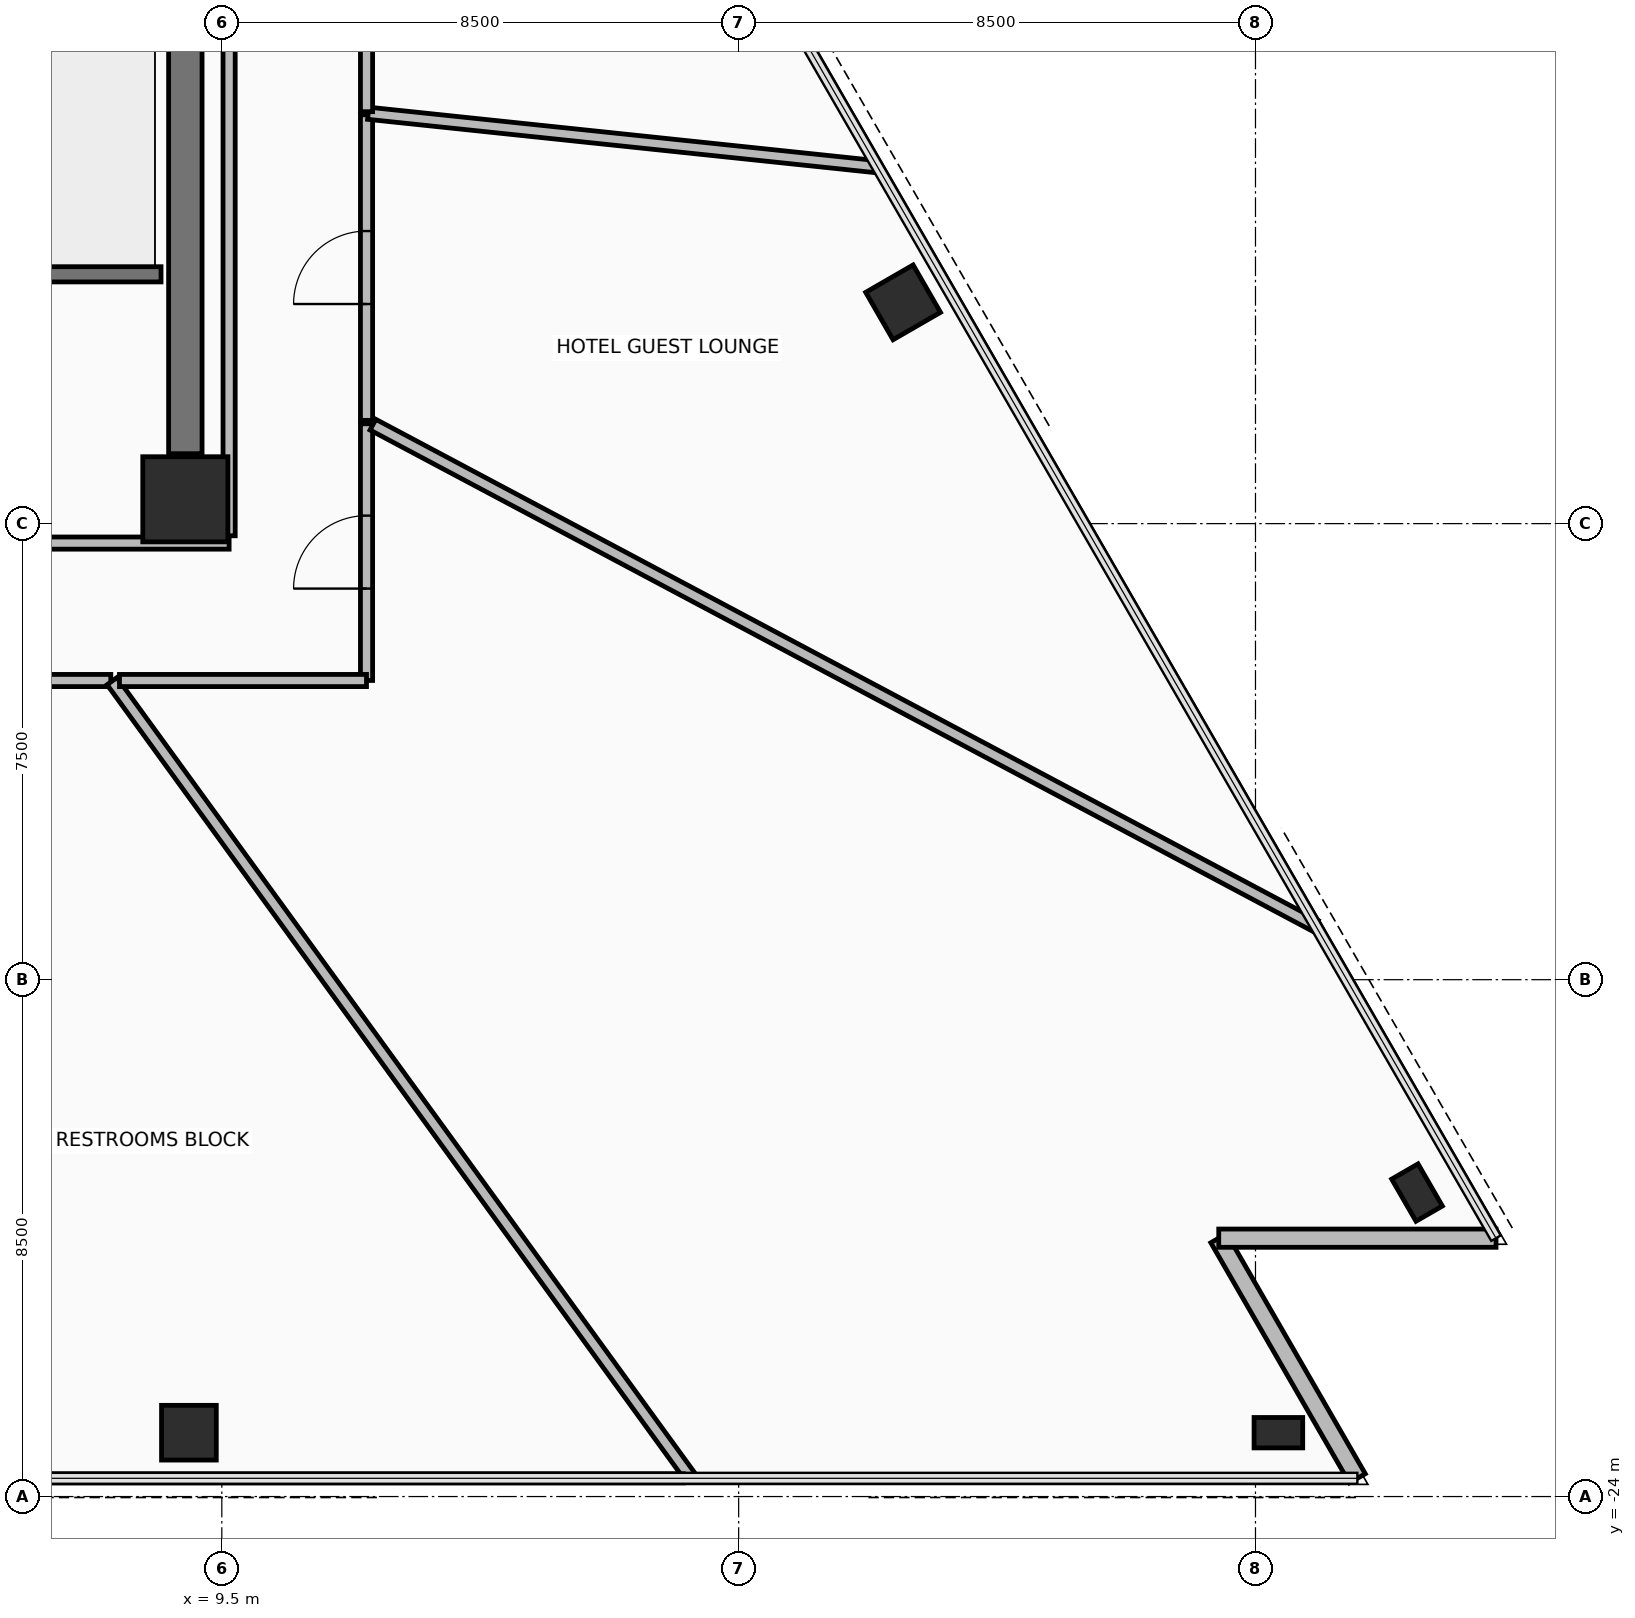
"""IFC4 building model, lengths in metres.
Left out: names, types, materials, properties, quantities, classifications, styles, units other than length and angle.
Written with IfcOpenShell. Run it as: python <this file> out.ifc"""

import sys

from ifc_helpers import new_model, si_unit, direction, frame, frame_2d, origin, origin_2d, place, context, subcontext, project, spatial, rectangle, hollow_rectangle, extrude, element, fill, save


model = new_model("IFC4")
c1 = context("Model", 3, precision=1e-05, world=origin(), true_north=direction((0.0, 1.0)))
c2 = subcontext(c1, "Body", "Model", "MODEL_VIEW")
j1 = project(units=[si_unit("LENGTHUNIT", "METRE"), si_unit("PLANEANGLEUNIT", "RADIAN")], contexts=[c1])
p1 = place(None, origin())
s1 = spatial("IfcSite", under=j1, at=p1, CompositionType="ELEMENT")
p2 = place(p1, origin())
s2 = spatial("IfcBuilding", under=s1, at=p2, CompositionType="ELEMENT")
p3 = place(p2, frame((0.0, 0.0, 45.45)))
s3 = spatial("IfcBuildingStorey", under=s2, at=p3, CompositionType="ELEMENT", Elevation=45.45)
p4 = place(p3, frame((8.9, -7.6, 0.0), z_axis=(0.0, 0.0, 1.0), x_axis=(1.0, 0.0, 0.0)))
e1 = element("IfcColumn", 1, at=p4, inside=s3, PredefinedType="COLUMN", context=c2, shape_type="SweptSolid", body=[
    extrude(rectangle(XDim=1.4, YDim=1.4, at=origin_2d()), origin(), (0.0, 0.0, 1.0), 3.4),
])
p5 = place(p3, frame((8.959, -22.95, 0.0), z_axis=(0.0, 0.0, 1.0), x_axis=(1.0, 0.0, 0.0)))
e2 = element("IfcColumn", 2, at=p5, inside=s3, PredefinedType="COLUMN", context=c2, shape_type="SweptSolid", body=[
    extrude(hollow_rectangle(XDim=0.9, YDim=0.9, WallThickness=0.05, at=origin_2d()), origin(), (0.0, 0.0, 1.0), 3.4),
])
for number, where, z_axis, x_axis in (
    (3, (26.877, -22.95, 0.0), (0.0, 0.0, 1.0), (1.0, 0.0, 0.0)),
    (4, (29.157, -19.001, 0.0), (0.0, 0.0, 1.0), (-0.5, 0.866, 0.0)),
):
    element("IfcColumn", number, at=place(p3, frame(where, z_axis=z_axis, x_axis=x_axis)), inside=s3, PredefinedType="COLUMN", context=c2, shape_type="SweptSolid", body=[
        extrude(hollow_rectangle(XDim=0.5, YDim=0.8, WallThickness=0.04, at=origin_2d()), origin(), (0.0, 0.0, 1.0), 3.4),
    ])
p6 = place(p3, frame((20.705, -4.361, 0.0), z_axis=(0.0, 0.0, 1.0), x_axis=(-0.500001511499, 0.866024531118, 0.0)))
e5 = element("IfcColumn", 5, at=p6, inside=s3, PredefinedType="COLUMN", context=c2, shape_type="SweptSolid", body=[
    extrude(hollow_rectangle(XDim=0.9, YDim=0.9, WallThickness=0.05, at=origin_2d()), origin(), (0.0, 0.0, 1.0), 3.4),
])
p7 = place(p3, frame((28.176, -23.7, 0.0), z_axis=(0.0, 0.0, 1.0), x_axis=(-0.500014431597, 0.866017071537, 0.0)))
e6 = element("IfcWall", 6, at=p7, inside=s3, PredefinedType="STANDARD", context=c2, shape_type="SweptSolid", body=[
    extrude(rectangle(XDim=4.56, YDim=0.3, at=frame_2d((2.28, 0.0))), origin(), (0.0, 0.0, 1.0), 2.42),
])
p8 = place(p3, frame((25.896, -19.751, 0.0), z_axis=(0.0, 0.0, 1.0), x_axis=(1.0, 0.0, 0.0)))
e7 = element("IfcWall", 7, at=p8, inside=s3, PredefinedType="STANDARD", context=c2, shape_type="SweptSolid", body=[
    extrude(rectangle(XDim=4.56, YDim=0.3, at=frame_2d((2.28, 0.0))), origin(), (0.0, 0.0, 1.0), 2.42),
])
p9 = place(p3, frame((8.9, -6.85, 0.0), z_axis=(0.0, 0.0, 1.0), x_axis=(0.0, 1.0, 0.0)))
e8 = element("IfcWall", 8, at=p9, inside=s3, PredefinedType="SHEAR", context=c2, shape_type="SweptSolid", body=[
    extrude(rectangle(XDim=10.7, YDim=0.55, at=frame_2d((5.35, 0.0))), origin(), (0.0, 0.0, 1.0), 3.225),
])
p10 = place(p3, frame((-9.62, -8.32, 0.0), z_axis=(0.0, 0.0, 1.0), x_axis=(1.0, 0.0, 0.0)))
e9 = element("IfcWall", 9, at=p10, inside=s3, PredefinedType="PARTITIONING", context=c2, shape_type="SweptSolid", body=[
    extrude(rectangle(XDim=19.24, YDim=0.2, at=frame_2d((9.62, 0.0))), origin(), (0.0, 0.0, 1.0), 2.62),
])
p11 = place(p3, frame((9.62, -8.2, 0.0), z_axis=(0.0, 0.0, 1.0), x_axis=(0.0, 1.0, 0.0)))
e10 = element("IfcWall", 10, at=p11, inside=s3, PredefinedType="PARTITIONING", context=c2, shape_type="SweptSolid", body=[
    extrude(rectangle(XDim=16.4, YDim=0.2, at=frame_2d((8.2, 0.0))), origin(), (0.0, 0.0, 1.0), 2.62),
])
p12 = place(p11, frame((12.65, 0.0, 0.0)))
e11 = element("IfcOpeningElement", 11, at=p12, cuts=e10, PredefinedType="OPENING", context=c2, shape_type="SweptSolid", body=[
    extrude(rectangle(XDim=1.1, YDim=2.15, at=frame_2d((0.55, 1.075))), frame((0.0, 0.11, 0.0), z_axis=(0.0, -1.0, 0.0), x_axis=(1.0, 0.0, 0.0)), (0.0, 0.0, 1.0), 0.22),
])
p13 = place(p3, frame((5.5, -3.9, 0.0), z_axis=(0.0, 0.0, 1.0), x_axis=(1.0, 0.0, 0.0)))
e12 = element("IfcWall", 12, at=p13, inside=s3, PredefinedType="SHEAR", context=c2, shape_type="SweptSolid", body=[
    extrude(rectangle(XDim=3.0, YDim=0.25, at=frame_2d((1.5, 0.0))), origin(), (0.0, 0.0, 1.0), 3.225),
])
p14 = place(p3, frame((1.895, -10.58, 0.0), z_axis=(0.0, 0.0, 1.0), x_axis=(1.0, 0.0, 0.0)))
e13 = element("IfcWall", 13, at=p14, inside=s3, PredefinedType="PARTITIONING", context=c2, shape_type="SweptSolid", body=[
    extrude(rectangle(XDim=5.779, YDim=0.2, at=frame_2d((2.889, 0.0))), origin(), (0.0, 0.0, 1.0), 3.225),
])
p15 = place(p14, frame((2.464, 0.0, 0.0)))
e14 = element("IfcOpeningElement", 14, at=p15, cuts=e13, PredefinedType="OPENING", context=c2, shape_type="SweptSolid", body=[
    extrude(rectangle(XDim=0.85, YDim=2.1, at=frame_2d((0.425, 1.05))), frame((0.0, 0.11, 0.0), z_axis=(0.0, -1.0, 0.0), x_axis=(1.0, 0.0, 0.0)), (0.0, 0.0, 1.0), 0.22),
])
p16 = place(p3, frame((7.694, -10.59, 0.0), z_axis=(0.0, 0.0, 1.0), x_axis=(0.587783732443, -0.809018098608, 0.0)))
e15 = element("IfcWall", 15, at=p16, inside=s3, PredefinedType="PARTITIONING", context=c2, shape_type="SweptSolid", body=[
    extrude(rectangle(XDim=16.204, YDim=0.2, at=frame_2d((8.102, 0.0))), origin(), (0.0, 0.0, 1.0), 2.42),
])
p17 = place(p3, frame((17.089, -23.7, 0.0), z_axis=(0.0, 0.0, 1.0), x_axis=(-1.0, 0.0, 0.0)))
e16 = element("IfcWall", 16, at=p17, inside=s3, PredefinedType="PARTITIONING", context=c2, shape_type="SweptSolid", body=[
    extrude(rectangle(XDim=12.889, YDim=0.15, at=frame_2d((6.445, 0.0))), origin(), (0.0, 0.0, 1.0), 3.225),
])
p18 = place(p3, frame((11.88, -10.579, 0.0), z_axis=(0.0, 0.0, 1.0), x_axis=(0.0, 1.0, 0.0)))
e17 = element("IfcWall", 17, at=p18, inside=s3, PredefinedType="PARTITIONING", context=c2, shape_type="SweptSolid", body=[
    extrude(rectangle(XDim=4.221, YDim=0.2, at=frame_2d((2.11, 0.0))), origin(), (0.0, 0.0, 1.0), 2.62),
])
p19 = place(p18, frame((1.511, 0.0, 0.0)))
e18 = element("IfcOpeningElement", 18, at=p19, cuts=e17, PredefinedType="OPENING", context=c2, shape_type="SweptSolid", body=[
    extrude(rectangle(XDim=1.2, YDim=2.15, at=frame_2d((0.6, 1.075))), frame((0.0, 0.11, 0.0), z_axis=(0.0, -1.0, 0.0), x_axis=(1.0, 0.0, 0.0)), (0.0, 0.0, 1.0), 0.22),
])
p20 = place(p3, frame((11.985, -6.373, 0.0), z_axis=(0.0, 0.0, 1.0), x_axis=(0.882946229684, -0.469474126536, 0.0)))
e19 = element("IfcWall", 19, at=p20, inside=s3, PredefinedType="PARTITIONING", context=c2, shape_type="SweptSolid", body=[
    extrude(rectangle(XDim=17.556, YDim=0.2, at=frame_2d((8.778, 0.0))), origin(), (0.0, 0.0, 1.0), 2.42),
])
p21 = place(p3, frame((7.817, -10.58, 0.0), z_axis=(0.0, 0.0, 1.0), x_axis=(1.0, 0.0, 0.0)))
e20 = element("IfcWall", 20, at=p21, inside=s3, PredefinedType="PARTITIONING", context=c2, shape_type="SweptSolid", body=[
    extrude(rectangle(XDim=4.063, YDim=0.2, at=frame_2d((2.031, 0.0))), origin(), (0.0, 0.0, 1.0), 2.62),
])
p22 = place(p3, frame((11.88, -6.302, 0.0), z_axis=(0.0, 0.0, 1.0), x_axis=(0.0, 1.0, 0.0)))
e21 = element("IfcWall", 21, at=p22, inside=s3, PredefinedType="PARTITIONING", context=c2, shape_type="SweptSolid", body=[
    extrude(rectangle(XDim=5.025, YDim=0.2, at=frame_2d((2.513, 0.0))), origin(), (0.0, 0.0, 1.0), 3.225),
])
p23 = place(p22, frame((1.913, 0.0, 0.0)))
e22 = element("IfcOpeningElement", 22, at=p23, cuts=e21, PredefinedType="OPENING", context=c2, shape_type="SweptSolid", body=[
    extrude(rectangle(XDim=1.2, YDim=2.15, at=frame_2d((0.6, 1.075))), frame((0.0, 0.11, 0.0), z_axis=(0.0, -1.0, 0.0), x_axis=(1.0, 0.0, 0.0)), (0.0, 0.0, 1.0), 0.22),
])
p24 = place(p3, frame((11.908, -1.251, 0.0), z_axis=(0.0, 0.0, 1.0), x_axis=(0.994519920061, -0.104547255354, 0.0)))
e23 = element("IfcWall", 23, at=p24, inside=s3, PredefinedType="PARTITIONING", context=c2, shape_type="SweptSolid", body=[
    extrude(rectangle(XDim=8.409, YDim=0.2, at=frame_2d((4.205, 0.0))), origin(), (0.0, 0.0, 1.0), 2.42),
])
p25 = place(p3, frame((11.88, -1.226, 0.0), z_axis=(0.0, 0.0, 1.0), x_axis=(0.0, 1.0, 0.0)))
e24 = element("IfcWall", 24, at=p25, inside=s3, PredefinedType="PARTITIONING", context=c2, shape_type="SweptSolid", body=[
    extrude(rectangle(XDim=4.614, YDim=0.2, at=frame_2d((2.307, 0.0))), origin(), (0.0, 0.0, 1.0), 3.225),
])
p26 = place(p25, frame((1.707, 0.0, 0.0)))
e25 = element("IfcOpeningElement", 25, at=p26, cuts=e24, PredefinedType="OPENING", context=c2, shape_type="SweptSolid", body=[
    extrude(rectangle(XDim=1.2, YDim=2.15, at=frame_2d((0.6, 1.075))), frame((0.0, 0.11, 0.0), z_axis=(0.0, -1.0, 0.0), x_axis=(1.0, 0.0, 0.0)), (0.0, 0.0, 1.0), 0.22),
])
p27 = place(p19, origin())
e26 = element("IfcDoor", 26, at=p27, inside=s3, OperationType="SINGLE_SWING_LEFT", PredefinedType="DOOR", context=c2, shape_type="SweptSolid", body=[
    extrude(rectangle(XDim=1.2, YDim=2.15, at=frame_2d((0.6, 1.075))), frame((0.0, 0.025, 0.0), z_axis=(0.0, -1.0, 0.0), x_axis=(1.0, 0.0, 0.0)), (0.0, 0.0, 1.0), 0.05),
])
fill(e18, e26)
p28 = place(p23, origin())
e27 = element("IfcDoor", 27, at=p28, inside=s3, OperationType="SINGLE_SWING_LEFT", PredefinedType="DOOR", context=c2, shape_type="SweptSolid", body=[
    extrude(rectangle(XDim=1.2, YDim=2.15, at=frame_2d((0.6, 1.075))), frame((0.0, 0.025, 0.0), z_axis=(0.0, -1.0, 0.0), x_axis=(1.0, 0.0, 0.0)), (0.0, 0.0, 1.0), 0.05),
])
fill(e22, e27)
save(model, sys.argv[1])
